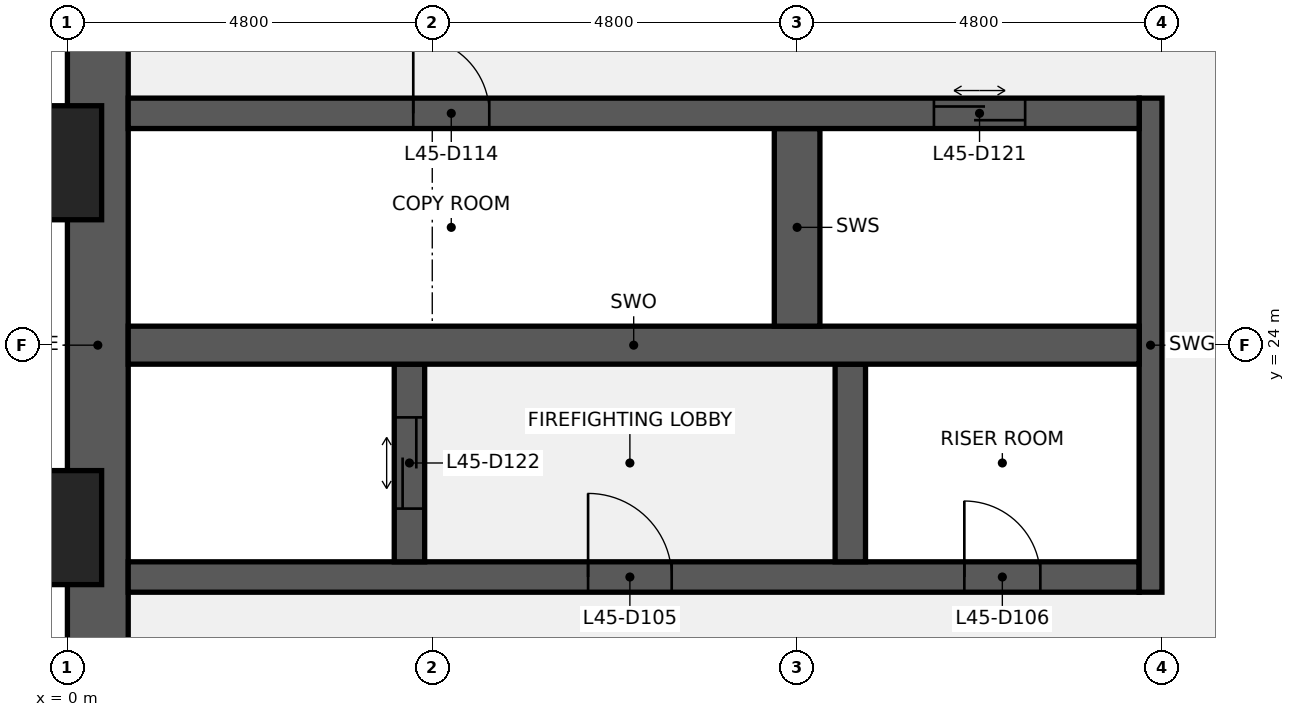
"""IFC4 building model, lengths in metres.
Left out: names, types, materials, properties, quantities, classifications, styles, units other than length and angle.
Written with IfcOpenShell. Run it as: python <this file> out.ifc"""

import sys

from ifc_helpers import new_model, si_unit, direction, frame, frame_2d, origin, origin_2d, place, context, subcontext, project, spatial, rectangle, extrude, element, fill, save


model = new_model("IFC4")
c1 = context("Model", 3, precision=1e-05, world=origin(), true_north=direction((0.0, 1.0)))
c2 = subcontext(c1, "Body", "Model", "MODEL_VIEW")
j1 = project(units=[si_unit("LENGTHUNIT", "METRE"), si_unit("PLANEANGLEUNIT", "RADIAN")], contexts=[c1])
p1 = place(None, origin())
s1 = spatial("IfcSite", under=j1, at=p1, CompositionType="ELEMENT")
p2 = place(p1, origin())
s2 = spatial("IfcBuilding", under=s1, at=p2, CompositionType="ELEMENT")
p3 = place(p2, frame((0.0, 0.0, 209.2)))
s3 = spatial("IfcBuildingStorey", under=s2, at=p3, CompositionType="ELEMENT", Elevation=209.2)
p4 = place(p3, frame((0.4, 9.6, 0.0), z_axis=(0.0, 0.0, 1.0), x_axis=(0.0, 1.0, 0.0)))
e1 = element("IfcWall", 1, at=p4, inside=s3, PredefinedType="SHEAR", context=c2, shape_type="SweptSolid", body=[
    extrude(rectangle(XDim=28.8, YDim=0.8, at=frame_2d((14.4, 0.0))), origin(), (0.0, 0.0, 1.0), 3.84),
])
p5 = place(p4, frame((8.85, 0.0, 0.9)))
e2 = element("IfcOpeningElement", 2, at=p5, cuts=e1, PredefinedType="OPENING", context=c2, shape_type="SweptSolid", body=[
    extrude(rectangle(XDim=1.5, YDim=1.5, at=frame_2d((0.75, 0.75))), frame((0.0, 0.41, 0.0), z_axis=(0.0, -1.0, 0.0), x_axis=(1.0, 0.0, 0.0)), (0.0, 0.0, 1.0), 0.82),
])
p6 = place(p4, frame((18.45, 0.0, 0.9)))
e3 = element("IfcOpeningElement", 3, at=p6, cuts=e1, PredefinedType="OPENING", context=c2, shape_type="SweptSolid", body=[
    extrude(rectangle(XDim=1.5, YDim=1.5, at=frame_2d((0.75, 0.75))), frame((0.0, 0.41, 0.0), z_axis=(0.0, -1.0, 0.0), x_axis=(1.0, 0.0, 0.0)), (0.0, 0.0, 1.0), 0.82),
])
p7 = place(p3, frame((0.8, 20.95, 0.0), z_axis=(0.0, 0.0, 1.0), x_axis=(1.0, 0.0, 0.0)))
e4 = element("IfcWall", 4, at=p7, inside=s3, PredefinedType="SHEAR", context=c2, shape_type="SweptSolid", body=[
    extrude(rectangle(XDim=13.3, YDim=0.4, at=frame_2d((6.65, 0.0))), origin(), (0.0, 0.0, 1.0), 3.84),
])
p8 = place(p7, frame((6.05, 0.0, 0.0)))
e5 = element("IfcOpeningElement", 5, at=p8, cuts=e4, PredefinedType="OPENING", context=c2, shape_type="SweptSolid", body=[
    extrude(rectangle(XDim=1.1, YDim=2.1, at=frame_2d((0.55, 1.05))), frame((0.0, 0.21, 0.0), z_axis=(0.0, -1.0, 0.0), x_axis=(1.0, 0.0, 0.0)), (0.0, 0.0, 1.0), 0.42),
])
p9 = place(p7, frame((11.0, 0.0, 0.0)))
e6 = element("IfcOpeningElement", 6, at=p9, cuts=e4, PredefinedType="OPENING", context=c2, shape_type="SweptSolid", body=[
    extrude(rectangle(XDim=1.0, YDim=2.1, at=frame_2d((0.5, 1.05))), frame((0.0, 0.21, 0.0), z_axis=(0.0, -1.0, 0.0), x_axis=(1.0, 0.0, 0.0)), (0.0, 0.0, 1.0), 0.42),
])
p10 = place(p3, frame((14.25, 20.75, 0.0), z_axis=(0.0, 0.0, 1.0), x_axis=(0.0, 1.0, 0.0)))
e7 = element("IfcWall", 7, at=p10, inside=s3, PredefinedType="SHEAR", context=c2, shape_type="SweptSolid", body=[
    extrude(rectangle(XDim=6.5, YDim=0.3, at=frame_2d((3.25, 0.0))), origin(), (0.0, 0.0, 1.0), 3.84),
])
p11 = place(p3, frame((4.5, 21.15, 0.0), z_axis=(0.0, 0.0, 1.0), x_axis=(0.0, 1.0, 0.0)))
e8 = element("IfcWall", 8, at=p11, inside=s3, PredefinedType="SHEAR", context=c2, shape_type="SweptSolid", body=[
    extrude(rectangle(XDim=2.6, YDim=0.4, at=frame_2d((1.3, 0.0))), origin(), (0.0, 0.0, 1.0), 3.84),
])
p12 = place(p11, frame((0.7, 0.0, 0.0)))
e9 = element("IfcOpeningElement", 9, at=p12, cuts=e8, PredefinedType="OPENING", context=c2, shape_type="SweptSolid", body=[
    extrude(rectangle(XDim=1.2, YDim=2.1, at=frame_2d((0.6, 1.05))), frame((0.0, 0.21, 0.0), z_axis=(0.0, -1.0, 0.0), x_axis=(1.0, 0.0, 0.0)), (0.0, 0.0, 1.0), 0.42),
])
p13 = place(p3, frame((10.3, 21.15, 0.0), z_axis=(0.0, 0.0, 1.0), x_axis=(0.0, 1.0, 0.0)))
e10 = element("IfcWall", 10, at=p13, inside=s3, PredefinedType="SHEAR", context=c2, shape_type="SweptSolid", body=[
    extrude(rectangle(XDim=2.6, YDim=0.4, at=frame_2d((1.3, 0.0))), origin(), (0.0, 0.0, 1.0), 3.84),
])
p14 = place(p3, frame((0.8, 24.0, 0.0), z_axis=(0.0, 0.0, 1.0), x_axis=(1.0, 0.0, 0.0)))
e11 = element("IfcWall", 11, at=p14, inside=s3, PredefinedType="SHEAR", context=c2, shape_type="SweptSolid", body=[
    extrude(rectangle(XDim=13.3, YDim=0.5, at=frame_2d((6.65, 0.0))), origin(), (0.0, 0.0, 1.0), 3.84),
])
p15 = place(p3, frame((9.6, 24.25, 0.0), z_axis=(0.0, 0.0, 1.0), x_axis=(0.0, 1.0, 0.0)))
e12 = element("IfcWall", 12, at=p15, inside=s3, PredefinedType="SHEAR", context=c2, shape_type="SweptSolid", body=[
    extrude(rectangle(XDim=2.6, YDim=0.6, at=frame_2d((1.3, 0.0))), origin(), (0.0, 0.0, 1.0), 3.84),
])
p16 = place(p3, frame((0.8, 27.05, 0.0), z_axis=(0.0, 0.0, 1.0), x_axis=(1.0, 0.0, 0.0)))
e13 = element("IfcWall", 13, at=p16, inside=s3, PredefinedType="SHEAR", context=c2, shape_type="SweptSolid", body=[
    extrude(rectangle(XDim=13.3, YDim=0.4, at=frame_2d((6.65, 0.0))), origin(), (0.0, 0.0, 1.0), 3.84),
])
p17 = place(p16, frame((3.75, 0.0, 0.0)))
e14 = element("IfcOpeningElement", 14, at=p17, cuts=e13, PredefinedType="OPENING", context=c2, shape_type="SweptSolid", body=[
    extrude(rectangle(XDim=1.0, YDim=2.1, at=frame_2d((0.5, 1.05))), frame((0.0, 0.21, 0.0), z_axis=(0.0, -1.0, 0.0), x_axis=(1.0, 0.0, 0.0)), (0.0, 0.0, 1.0), 0.42),
])
p18 = place(p16, frame((10.6, 0.0, 0.0)))
e15 = element("IfcOpeningElement", 15, at=p18, cuts=e13, PredefinedType="OPENING", context=c2, shape_type="SweptSolid", body=[
    extrude(rectangle(XDim=1.2, YDim=2.1, at=frame_2d((0.6, 1.05))), frame((0.0, 0.21, 0.0), z_axis=(0.0, -1.0, 0.0), x_axis=(1.0, 0.0, 0.0)), (0.0, 0.0, 1.0), 0.42),
])
for number, where, z_axis, x_axis in (
    (16, (-0.75, 21.6, 0.0), (0.0, 0.0, 1.0), (0.0, 1.0, 0.0)),
    (17, (-0.75, 26.4, 0.0), (0.0, 0.0, 1.0), (0.0, 1.0, 0.0)),
):
    element("IfcColumn", number, at=place(p3, frame(where, z_axis=z_axis, x_axis=x_axis)), inside=s3, PredefinedType="PILASTER", context=c2, shape_type="SweptSolid", body=[
        extrude(rectangle(XDim=2.4, YDim=1.5, at=origin_2d()), origin(), (0.0, 0.0, 1.0), 4.0),
    ])
p19 = place(p8, origin())
e18 = element("IfcDoor", 18, at=p19, inside=s3, OperationType="SINGLE_SWING_LEFT", PredefinedType="DOOR", context=c2, shape_type="SweptSolid", body=[
    extrude(rectangle(XDim=1.1, YDim=2.1, at=frame_2d((0.55, 1.05))), frame((0.0, 0.025, 0.0), z_axis=(0.0, -1.0, 0.0), x_axis=(1.0, 0.0, 0.0)), (0.0, 0.0, 1.0), 0.05),
])
fill(e5, e18)
p20 = place(p9, origin())
e19 = element("IfcDoor", 19, at=p20, inside=s3, OperationType="SINGLE_SWING_LEFT", PredefinedType="DOOR", context=c2, shape_type="SweptSolid", body=[
    extrude(rectangle(XDim=1.0, YDim=2.1, at=frame_2d((0.5, 1.05))), frame((0.0, 0.025, 0.0), z_axis=(0.0, -1.0, 0.0), x_axis=(1.0, 0.0, 0.0)), (0.0, 0.0, 1.0), 0.05),
])
fill(e6, e19)
p21 = place(p17, origin())
e20 = element("IfcDoor", 20, at=p21, inside=s3, OperationType="SINGLE_SWING_LEFT", PredefinedType="DOOR", context=c2, shape_type="SweptSolid", body=[
    extrude(rectangle(XDim=1.0, YDim=2.1, at=frame_2d((0.5, 1.05))), frame((0.0, 0.025, 0.0), z_axis=(0.0, -1.0, 0.0), x_axis=(1.0, 0.0, 0.0)), (0.0, 0.0, 1.0), 0.05),
])
fill(e14, e20)
p22 = place(p18, origin())
e21 = element("IfcDoor", 21, at=p22, inside=s3, OperationType="DOUBLE_DOOR_SLIDING", PredefinedType="DOOR", context=c2, shape_type="SweptSolid", body=[
    extrude(rectangle(XDim=1.2, YDim=2.1, at=frame_2d((0.6, 1.05))), frame((0.0, 0.025, 0.0), z_axis=(0.0, -1.0, 0.0), x_axis=(1.0, 0.0, 0.0)), (0.0, 0.0, 1.0), 0.05),
])
fill(e15, e21)
p23 = place(p12, origin())
e22 = element("IfcDoor", 22, at=p23, inside=s3, OperationType="DOUBLE_DOOR_SLIDING", PredefinedType="DOOR", context=c2, shape_type="SweptSolid", body=[
    extrude(rectangle(XDim=1.2, YDim=2.1, at=frame_2d((0.6, 1.05))), frame((0.0, 0.025, 0.0), z_axis=(0.0, -1.0, 0.0), x_axis=(1.0, 0.0, 0.0)), (0.0, 0.0, 1.0), 0.05),
])
fill(e9, e22)
save(model, sys.argv[1])
